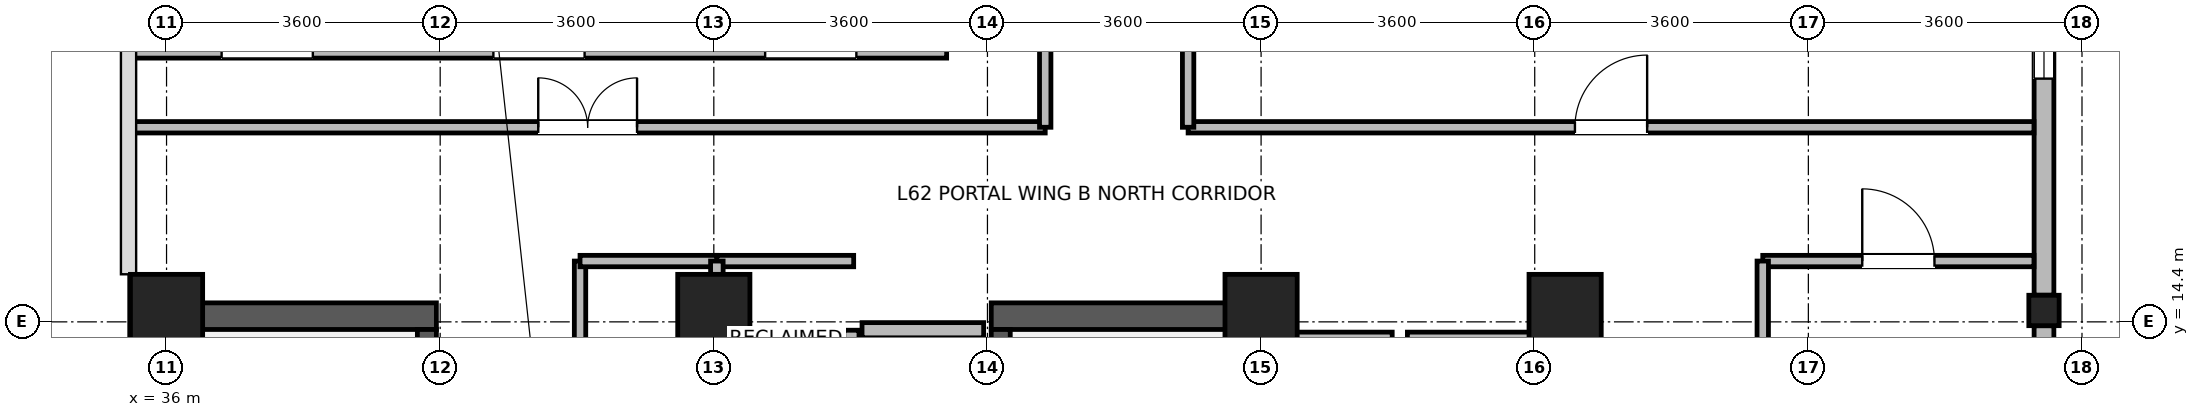
"""IFC4 building model, lengths in metres.
Left out: names, types, materials, properties, quantities, classifications, styles, units other than length and angle.
Written with IfcOpenShell. Run it as: python <this file> out.ifc"""

import sys

from ifc_helpers import new_model, si_unit, direction, frame, frame_2d, origin, origin_2d, place, context, subcontext, project, spatial, rectangle, i_section, extrude, source, transform, mapped, element, fill, save


model = new_model("IFC4")
c1 = context("Model", 3, precision=1e-05, world=origin(), true_north=direction((0.0, 1.0)))
c2 = subcontext(c1, "Body", "Model", "MODEL_VIEW")
j1 = project(units=[si_unit("LENGTHUNIT", "METRE"), si_unit("PLANEANGLEUNIT", "RADIAN")], contexts=[c1])
p1 = place(None, origin())
s1 = spatial("IfcSite", under=j1, at=p1, CompositionType="ELEMENT")
p2 = place(p1, origin())
s2 = spatial("IfcBuilding", under=s1, at=p2, CompositionType="ELEMENT")
p3 = place(p2, frame((0.0, 0.0, 242.5)))
s3 = spatial("IfcBuildingStorey", under=s2, at=p3, CompositionType="ELEMENT", Elevation=242.5)
for number, where, z_axis, x_axis in (
    (1, (36.175, 6.95, 0.0), (0.0, 0.0, 1.0), (0.0, 1.0, 0.0)),
    (2, (50.225, 6.95, 0.0), (0.0, 0.0, 1.0), (0.0, 1.0, 0.0)),
):
    element("IfcWall", number, at=place(p3, frame(where, z_axis=z_axis, x_axis=x_axis)), inside=s3, PredefinedType="SHEAR", context=c2, shape_type="SweptSolid", body=[
        extrude(rectangle(XDim=7.7, YDim=0.35, at=frame_2d((3.85, 0.0))), origin(), (0.0, 0.0, 1.0), 3.44),
    ])
for number, where, z_axis, x_axis in (
    (3, (36.35, 14.475, 0.0), (0.0, 0.0, 1.0), (1.0, 0.0, 0.0)),
    (4, (46.85, 14.475, 0.0), (0.0, 0.0, 1.0), (1.0, 0.0, 0.0)),
):
    element("IfcWall", number, at=place(p3, frame(where, z_axis=z_axis, x_axis=x_axis)), inside=s3, PredefinedType="SHEAR", context=c2, shape_type="SweptSolid", body=[
        extrude(rectangle(XDim=3.2, YDim=0.35, at=frame_2d((1.6, 0.0))), origin(), (0.0, 0.0, 1.0), 3.44),
    ])
p4 = place(p3, frame((39.425, 7.3, 0.0), z_axis=(0.0, 0.0, 1.0), x_axis=(0.0, 1.0, 0.0)))
e5 = element("IfcWall", 5, at=p4, inside=s3, PredefinedType="SHEAR", context=c2, shape_type="SweptSolid", body=[
    extrude(rectangle(XDim=7.0, YDim=0.25, at=frame_2d((3.5, 0.0))), origin(), (0.0, 0.0, 1.0), 3.44),
])
p5 = place(p4, frame((0.15, 0.0, 0.0)))
e6 = element("IfcOpeningElement", 6, at=p5, cuts=e5, PredefinedType="OPENING", context=c2, shape_type="SweptSolid", body=[
    extrude(rectangle(XDim=1.1, YDim=2.08, at=frame_2d((0.55, 1.04))), frame((0.0, 0.135, 0.0), z_axis=(0.0, -1.0, 0.0), x_axis=(1.0, 0.0, 0.0)), (0.0, 0.0, 1.0), 0.27),
])
p6 = place(p3, frame((46.975, 7.3, 0.0), z_axis=(0.0, 0.0, 1.0), x_axis=(0.0, 1.0, 0.0)))
e7 = element("IfcWall", 7, at=p6, inside=s3, PredefinedType="SHEAR", context=c2, shape_type="SweptSolid", body=[
    extrude(rectangle(XDim=7.0, YDim=0.25, at=frame_2d((3.5, 0.0))), origin(), (0.0, 0.0, 1.0), 3.44),
])
p7 = place(p6, frame((0.15, 0.0, 0.0)))
e8 = element("IfcOpeningElement", 8, at=p7, cuts=e7, PredefinedType="OPENING", context=c2, shape_type="SweptSolid", body=[
    extrude(rectangle(XDim=1.1, YDim=2.08, at=frame_2d((0.55, 1.04))), frame((0.0, 0.135, 0.0), z_axis=(0.0, -1.0, 0.0), x_axis=(1.0, 0.0, 0.0)), (0.0, 0.0, 1.0), 0.27),
])
m1 = source(origin(), c2, "Body", "SweptSolid", [
    extrude(rectangle(XDim=0.95, YDim=0.95, at=origin_2d()), origin(), (0.0, 0.0, 1.0), 3.7),
])
for number, where, z_axis, x_axis in (
    (9, (36.0, 14.55, 0.0), (0.0, 0.0, 1.0), (1.0, 0.0, 0.0)),
    (10, (43.2, 14.55, 0.0), (0.0, 0.0, 1.0), (1.0, 0.0, 0.0)),
    (11, (50.4, 14.55, 0.0), (0.0, 0.0, 1.0), (1.0, 0.0, 0.0)),
    (12, (54.4, 14.55, 0.0), (0.0, 0.0, 1.0), (1.0, 0.0, 0.0)),
):
    element("IfcColumn", number, at=place(p3, frame(where, z_axis=z_axis, x_axis=x_axis)), inside=s3, PredefinedType="COLUMN", context=c2, shape_type="MappedRepresentation", body=[
        mapped(m1, transform((0.0, 0.0, 0.0), x_axis=(1.0, 0.0, 0.0), y_axis=(0.0, 1.0, 0.0), z_axis=(0.0, 0.0, 1.0), scale=1.0)),
    ])
m2 = source(origin(), c2, "Body", "SweptSolid", [
    extrude(i_section(OverallWidth=0.399, OverallDepth=0.4, WebThickness=0.017, FlangeThickness=0.023, FilletRadius=0.015, at=origin_2d()), origin(), (0.0, 0.0, 1.0), 3.7),
])
p8 = place(p3, frame((60.7, 14.55, 0.0), z_axis=(0.0, 0.0, 1.0), x_axis=(1.0, 0.0, 0.0)))
e13 = element("IfcColumn", 13, at=p8, inside=s3, PredefinedType="COLUMN", context=c2, shape_type="MappedRepresentation", body=[
    mapped(m2, transform((0.0, 0.0, 0.0), x_axis=(1.0, 0.0, 0.0), y_axis=(0.0, 1.0, 0.0), z_axis=(0.0, 0.0, 1.0), scale=1.0)),
])
p9 = place(p3, frame((60.7, 14.349, 0.0), z_axis=(0.0, 0.0, 1.0), x_axis=(0.0, -1.0, 0.0)))
e14 = element("IfcWall", 14, at=p9, inside=s3, PredefinedType="STANDARD", context=c2, shape_type="SweptSolid", body=[
    extrude(rectangle(XDim=5.079, YDim=0.26, at=frame_2d((2.54, 0.0))), origin(), (0.0, 0.0, 1.0), 3.02),
])
p10 = place(p9, frame((1.939, 0.0, 0.85)))
e15 = element("IfcOpeningElement", 15, at=p10, cuts=e14, PredefinedType="OPENING", context=c2, shape_type="SweptSolid", body=[
    extrude(rectangle(XDim=1.2, YDim=1.75, at=frame_2d((0.6, 0.875))), frame((0.0, 0.14, 0.0), z_axis=(0.0, -1.0, 0.0), x_axis=(1.0, 0.0, 0.0)), (0.0, 0.0, 1.0), 0.28),
])
p11 = place(p3, frame((60.7, 21.399, 0.0), z_axis=(0.0, 0.0, 1.0), x_axis=(0.0, -1.0, 0.0)))
e16 = element("IfcWall", 16, at=p11, inside=s3, PredefinedType="STANDARD", context=c2, shape_type="SweptSolid", body=[
    extrude(rectangle(XDim=6.648, YDim=0.26, at=frame_2d((3.324, 0.0))), origin(), (0.0, 0.0, 1.0), 3.02),
])
p12 = place(p11, frame((1.062, 0.0, 0.85)))
e17 = element("IfcOpeningElement", 17, at=p12, cuts=e16, PredefinedType="OPENING", context=c2, shape_type="SweptSolid", body=[
    extrude(rectangle(XDim=1.2, YDim=1.75, at=frame_2d((0.6, 0.875))), frame((0.0, 0.14, 0.0), z_axis=(0.0, -1.0, 0.0), x_axis=(1.0, 0.0, 0.0)), (0.0, 0.0, 1.0), 0.28),
])
p13 = place(p11, frame((2.849, 0.0, 0.85)))
e18 = element("IfcOpeningElement", 18, at=p13, cuts=e16, PredefinedType="OPENING", context=c2, shape_type="SweptSolid", body=[
    extrude(rectangle(XDim=0.95, YDim=1.75, at=frame_2d((0.475, 0.875))), frame((0.0, 0.14, 0.0), z_axis=(0.0, -1.0, 0.0), x_axis=(1.0, 0.0, 0.0)), (0.0, 0.0, 1.0), 0.28),
])
p14 = place(p3, frame((35.537, 18.0, 0.0), z_axis=(0.0, 0.0, 1.0), x_axis=(1.0, 0.0, 0.0)))
e19 = element("IfcWall", 19, at=p14, inside=s3, PredefinedType="STANDARD", context=c2, shape_type="SweptSolid", body=[
    extrude(rectangle(XDim=10.726, YDim=0.26, at=frame_2d((5.363, 0.0))), origin(), (0.0, 0.0, 1.0), 3.42),
])
p15 = place(p14, frame((1.188, 0.0, 0.85)))
e20 = element("IfcOpeningElement", 20, at=p15, cuts=e19, PredefinedType="OPENING", context=c2, shape_type="SweptSolid", body=[
    extrude(rectangle(XDim=1.2, YDim=1.75, at=frame_2d((0.6, 0.875))), frame((0.0, 0.14, 0.0), z_axis=(0.0, -1.0, 0.0), x_axis=(1.0, 0.0, 0.0)), (0.0, 0.0, 1.0), 0.28),
])
p16 = place(p14, frame((4.763, 0.0, 0.85)))
e21 = element("IfcOpeningElement", 21, at=p16, cuts=e19, PredefinedType="OPENING", context=c2, shape_type="SweptSolid", body=[
    extrude(rectangle(XDim=1.2, YDim=1.75, at=frame_2d((0.6, 0.875))), frame((0.0, 0.14, 0.0), z_axis=(0.0, -1.0, 0.0), x_axis=(1.0, 0.0, 0.0)), (0.0, 0.0, 1.0), 0.28),
])
p17 = place(p14, frame((8.338, 0.0, 0.85)))
e22 = element("IfcOpeningElement", 22, at=p17, cuts=e19, PredefinedType="OPENING", context=c2, shape_type="SweptSolid", body=[
    extrude(rectangle(XDim=1.2, YDim=1.75, at=frame_2d((0.6, 0.875))), frame((0.0, 0.14, 0.0), z_axis=(0.0, -1.0, 0.0), x_axis=(1.0, 0.0, 0.0)), (0.0, 0.0, 1.0), 0.28),
])
p18 = place(p3, frame((50.475, 14.165, 0.0), z_axis=(0.0, 0.0, 1.0), x_axis=(1.0, 0.0, 0.0)))
e23 = element("IfcWall", 23, at=p18, inside=s3, PredefinedType="PARTITIONING", context=c2, shape_type="SweptSolid", body=[
    extrude(rectangle(XDim=1.65, YDim=0.2, at=frame_2d((0.825, 0.0))), origin(), (0.0, 0.0, 1.0), 3.42),
])
p19 = place(p3, frame((52.325, 14.165, 0.0), z_axis=(0.0, 0.0, 1.0), x_axis=(1.0, 0.0, 0.0)))
e24 = element("IfcWall", 24, at=p19, inside=s3, PredefinedType="PARTITIONING", context=c2, shape_type="SweptSolid", body=[
    extrude(rectangle(XDim=1.65, YDim=0.2, at=frame_2d((0.825, 0.0))), origin(), (0.0, 0.0, 1.0), 3.42),
])
p20 = place(p3, frame((45.15, 14.29, 0.0), z_axis=(0.0, 0.0, 1.0), x_axis=(1.0, 0.0, 0.0)))
e25 = element("IfcWall", 25, at=p20, inside=s3, PredefinedType="PARTITIONING", context=c2, shape_type="SweptSolid", body=[
    extrude(rectangle(XDim=1.6, YDim=0.2, at=frame_2d((0.8, 0.0))), origin(), (0.0, 0.0, 1.0), 2.52),
])
p21 = place(p3, frame((45.01, 11.61, 0.0), z_axis=(0.0, 0.0, 1.0), x_axis=(0.0, 1.0, 0.0)))
e26 = element("IfcWall", 26, at=p21, inside=s3, PredefinedType="PARTITIONING", context=c2, shape_type="SweptSolid", body=[
    extrude(rectangle(XDim=2.68, YDim=0.2, at=frame_2d((1.34, 0.0))), origin(), (0.0, 0.0, 1.0), 3.42),
])
p22 = place(p3, frame((35.52, 16.96, 0.0), z_axis=(0.0, 0.0, 1.0), x_axis=(1.0, 0.0, 0.0)))
e27 = element("IfcWall", 27, at=p22, inside=s3, PredefinedType="PARTITIONING", context=c2, shape_type="SweptSolid", body=[
    extrude(rectangle(XDim=12.04, YDim=0.15, at=frame_2d((6.02, 0.0))), origin(), (0.0, 0.0, 1.0), 3.42),
])
p23 = place(p22, frame((5.37, 0.0, 0.0)))
e28 = element("IfcOpeningElement", 28, at=p23, cuts=e27, PredefinedType="OPENING", context=c2, shape_type="SweptSolid", body=[
    extrude(rectangle(XDim=1.3, YDim=2.12, at=frame_2d((0.65, 1.06))), frame((0.0, 0.085, 0.0), z_axis=(0.0, -1.0, 0.0), x_axis=(1.0, 0.0, 0.0)), (0.0, 0.0, 1.0), 0.17),
])
p24 = place(p3, frame((49.44, 16.96, 0.0), z_axis=(0.0, 0.0, 1.0), x_axis=(1.0, 0.0, 0.0)))
e29 = element("IfcWall", 29, at=p24, inside=s3, PredefinedType="PARTITIONING", context=c2, shape_type="SweptSolid", body=[
    extrude(rectangle(XDim=11.128, YDim=0.15, at=frame_2d((5.564, 0.0))), origin(), (0.0, 0.0, 1.0), 3.42),
])
p25 = place(p24, frame((5.089, 0.0, 0.0)))
e30 = element("IfcOpeningElement", 30, at=p25, cuts=e29, PredefinedType="OPENING", context=c2, shape_type="SweptSolid", body=[
    extrude(rectangle(XDim=0.95, YDim=2.1, at=frame_2d((0.475, 1.05))), frame((0.0, 0.085, 0.0), z_axis=(0.0, -1.0, 0.0), x_axis=(1.0, 0.0, 0.0)), (0.0, 0.0, 1.0), 0.17),
])
p26 = place(p3, frame((47.56, 16.96, 0.0), z_axis=(0.0, 0.0, 1.0), x_axis=(0.0, 1.0, 0.0)))
e31 = element("IfcWall", 31, at=p26, inside=s3, PredefinedType="PARTITIONING", context=c2, shape_type="SweptSolid", body=[
    extrude(rectangle(XDim=4.44, YDim=0.15, at=frame_2d((2.22, 0.0))), origin(), (0.0, 0.0, 1.0), 3.42),
])
p27 = place(p3, frame((49.44, 16.96, 0.0), z_axis=(0.0, 0.0, 1.0), x_axis=(0.0, 1.0, 0.0)))
e32 = element("IfcWall", 32, at=p27, inside=s3, PredefinedType="PARTITIONING", context=c2, shape_type="SweptSolid", body=[
    extrude(rectangle(XDim=3.76, YDim=0.15, at=frame_2d((1.88, 0.0))), origin(), (0.0, 0.0, 1.0), 3.42),
])
p28 = place(p3, frame((57.0, 15.2, 0.0), z_axis=(0.0, 0.0, 1.0), x_axis=(1.0, 0.0, 0.0)))
e33 = element("IfcWall", 33, at=p28, inside=s3, PredefinedType="PARTITIONING", context=c2, shape_type="SweptSolid", body=[
    extrude(rectangle(XDim=3.568, YDim=0.15, at=frame_2d((1.784, 0.0))), origin(), (0.0, 0.0, 1.0), 3.42),
])
p29 = place(p28, frame((1.309, 0.0, 0.0)))
e34 = element("IfcOpeningElement", 34, at=p29, cuts=e33, PredefinedType="OPENING", context=c2, shape_type="SweptSolid", body=[
    extrude(rectangle(XDim=0.95, YDim=2.1, at=frame_2d((0.475, 1.05))), frame((0.0, 0.085, 0.0), z_axis=(0.0, -1.0, 0.0), x_axis=(1.0, 0.0, 0.0)), (0.0, 0.0, 1.0), 0.17),
])
p30 = place(p3, frame((41.44, 11.64, 0.0), z_axis=(0.0, 0.0, 1.0), x_axis=(0.0, 1.0, 0.0)))
e35 = element("IfcWall", 35, at=p30, inside=s3, PredefinedType="PARTITIONING", context=c2, shape_type="SweptSolid", body=[
    extrude(rectangle(XDim=3.56, YDim=0.15, at=frame_2d((1.78, 0.0))), origin(), (0.0, 0.0, 1.0), 3.42),
])
p31 = place(p30, frame((1.13, 0.0, 0.0)))
e36 = element("IfcOpeningElement", 36, at=p31, cuts=e35, PredefinedType="OPENING", context=c2, shape_type="SweptSolid", body=[
    extrude(rectangle(XDim=1.3, YDim=2.12, at=frame_2d((0.65, 1.06))), frame((0.0, 0.085, 0.0), z_axis=(0.0, -1.0, 0.0), x_axis=(1.0, 0.0, 0.0)), (0.0, 0.0, 1.0), 0.17),
])
p32 = place(p3, frame((57.0, 11.96, 0.0), z_axis=(0.0, 0.0, 1.0), x_axis=(0.0, 1.0, 0.0)))
e37 = element("IfcWall", 37, at=p32, inside=s3, PredefinedType="PARTITIONING", context=c2, shape_type="SweptSolid", body=[
    extrude(rectangle(XDim=3.24, YDim=0.15, at=frame_2d((1.62, 0.0))), origin(), (0.0, 0.0, 1.0), 3.42),
])
for number, where, z_axis, x_axis in (
    (38, (41.44, 15.2, 0.0), (0.0, 0.0, 1.0), (1.0, 0.0, 0.0)),
    (39, (43.24, 15.2, 0.0), (0.0, 0.0, 1.0), (1.0, 0.0, 0.0)),
):
    element("IfcWall", number, at=place(p3, frame(where, z_axis=z_axis, x_axis=x_axis)), inside=s3, PredefinedType="PARTITIONING", context=c2, shape_type="SweptSolid", body=[
        extrude(rectangle(XDim=1.8, YDim=0.15, at=frame_2d((0.9, 0.0))), origin(), (0.0, 0.0, 1.0), 3.42),
    ])
p33 = place(p3, frame((43.24, 11.64, 0.0), z_axis=(0.0, 0.0, 1.0), x_axis=(0.0, 1.0, 0.0)))
e40 = element("IfcWall", 40, at=p33, inside=s3, PredefinedType="PARTITIONING", context=c2, shape_type="SweptSolid", body=[
    extrude(rectangle(XDim=3.56, YDim=0.165, at=frame_2d((1.78, 0.0))), origin(), (0.0, 0.0, 1.0), 3.42),
])
p34 = place(p13, origin())
e41 = element("IfcWindow", 41, at=p34, inside=s3, PartitioningType="SINGLE_PANEL", PredefinedType="WINDOW", context=c2, shape_type="SweptSolid", body=[
    extrude(rectangle(XDim=0.95, YDim=1.75, at=frame_2d((0.475, 0.875))), frame((0.0, 0.03, 0.0), z_axis=(0.0, -1.0, 0.0), x_axis=(1.0, 0.0, 0.0)), (0.0, 0.0, 1.0), 0.06),
])
fill(e18, e41)
p35 = place(p23, origin())
e42 = element("IfcDoor", 42, at=p35, inside=s3, OperationType="DOUBLE_DOOR_SINGLE_SWING", PredefinedType="DOOR", context=c2, shape_type="SweptSolid", body=[
    extrude(rectangle(XDim=1.3, YDim=2.12, at=frame_2d((0.65, 1.06))), frame((0.0, 0.025, 0.0), z_axis=(0.0, -1.0, 0.0), x_axis=(1.0, 0.0, 0.0)), (0.0, 0.0, 1.0), 0.05),
])
fill(e28, e42)
p36 = place(p25, origin())
e43 = element("IfcDoor", 43, at=p36, inside=s3, OperationType="SINGLE_SWING_RIGHT", PredefinedType="DOOR", context=c2, shape_type="SweptSolid", body=[
    extrude(rectangle(XDim=0.95, YDim=2.1, at=frame_2d((0.475, 1.05))), frame((0.0, 0.025, 0.0), z_axis=(0.0, -1.0, 0.0), x_axis=(1.0, 0.0, 0.0)), (0.0, 0.0, 1.0), 0.05),
])
fill(e30, e43)
p37 = place(p29, origin())
e44 = element("IfcDoor", 44, at=p37, inside=s3, OperationType="SINGLE_SWING_LEFT", PredefinedType="DOOR", context=c2, shape_type="SweptSolid", body=[
    extrude(rectangle(XDim=0.95, YDim=2.1, at=frame_2d((0.475, 1.05))), frame((0.0, 0.025, 0.0), z_axis=(0.0, -1.0, 0.0), x_axis=(1.0, 0.0, 0.0)), (0.0, 0.0, 1.0), 0.05),
])
fill(e34, e44)
save(model, sys.argv[1])
